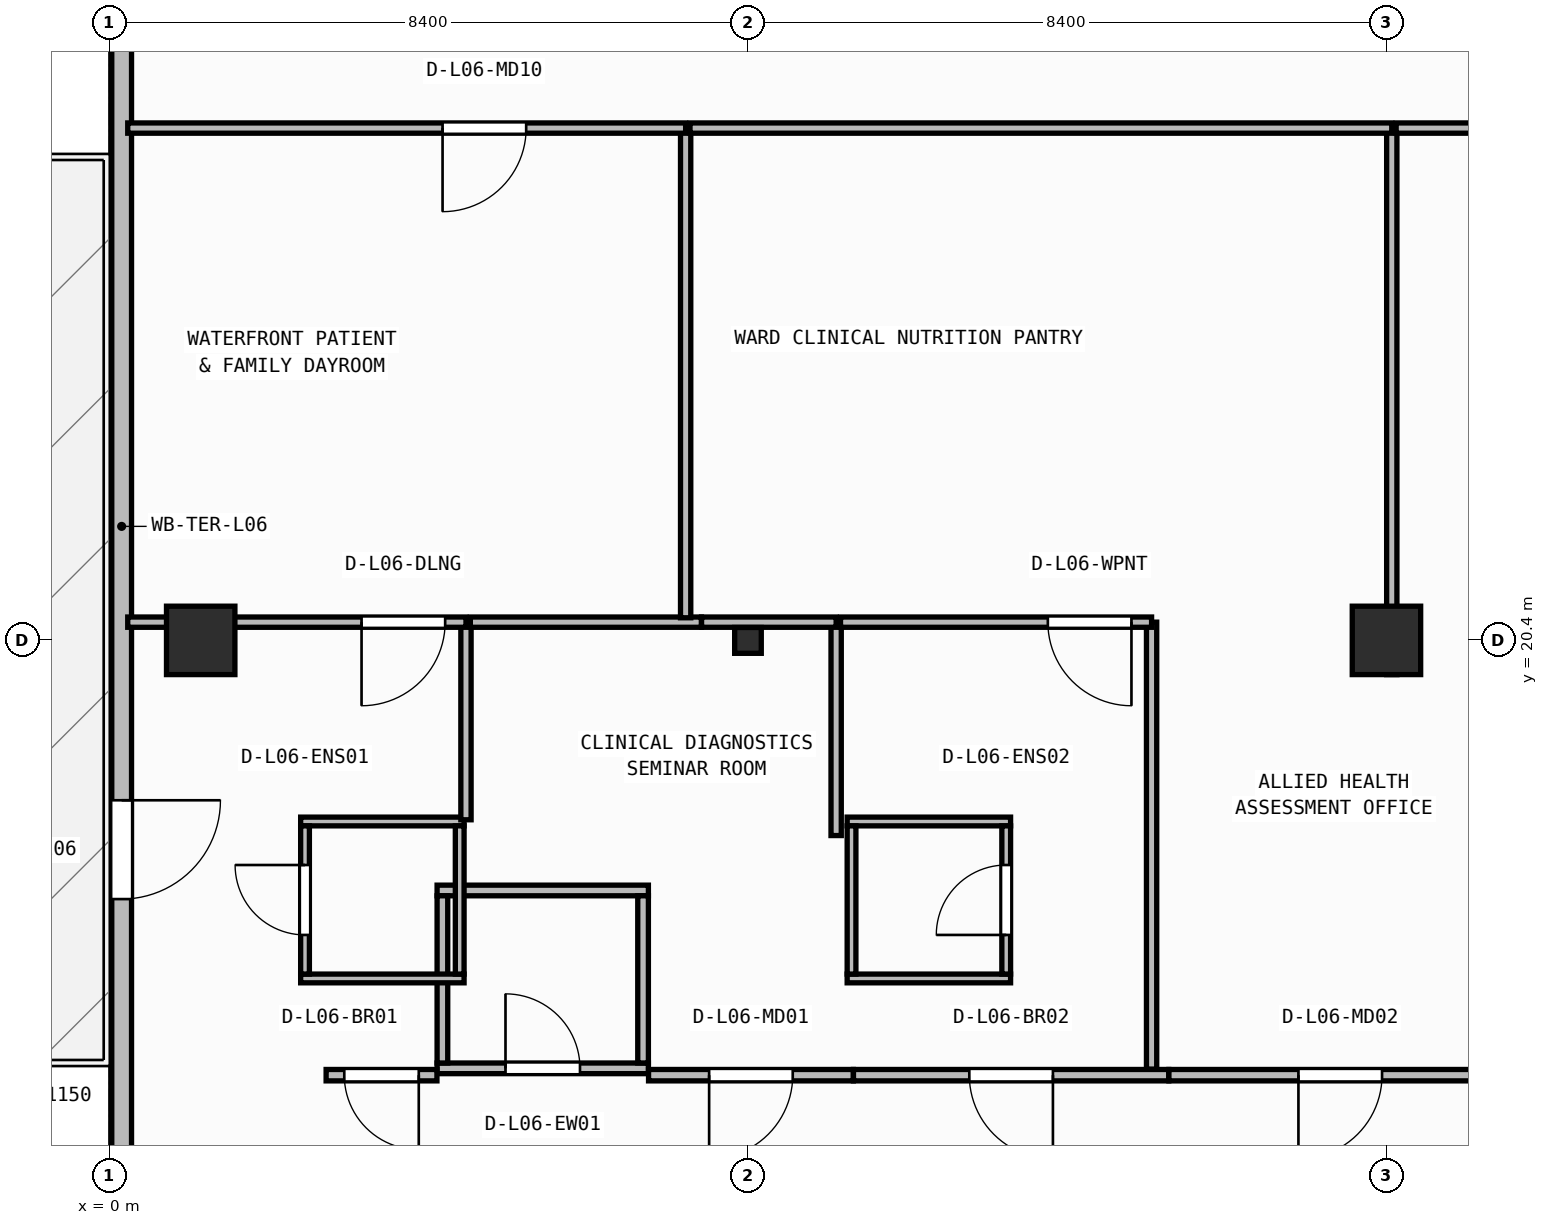
"""IFC4 building model, lengths in metres.
Left out: names, types, materials, properties, quantities, classifications, styles, units other than length and angle.
Written with IfcOpenShell. Run it as: python <this file> out.ifc"""

import sys

from ifc_helpers import new_model, si_unit, direction, frame, frame_2d, origin, origin_2d, place, context, subcontext, project, spatial, rectangle, i_section, extrude, element, fill, save


model = new_model("IFC4")
c1 = context("Model", 3, precision=1e-05, world=origin(), true_north=direction((0.0, 1.0)))
c2 = subcontext(c1, "Body", "Model", "MODEL_VIEW")
j1 = project(units=[si_unit("LENGTHUNIT", "METRE"), si_unit("PLANEANGLEUNIT", "RADIAN")], contexts=[c1])
p1 = place(None, origin())
s1 = spatial("IfcSite", under=j1, at=p1, CompositionType="ELEMENT")
p2 = place(p1, origin())
s2 = spatial("IfcBuilding", under=s1, at=p2, CompositionType="ELEMENT")
p3 = place(p2, frame((0.0, 0.0, 26.45)))
s3 = spatial("IfcBuildingStorey", under=s2, at=p3, CompositionType="ELEMENT", Elevation=26.45)
p4 = place(p3, frame((1.2, 20.4, 0.0), z_axis=(0.0, 0.0, 1.0), x_axis=(1.0, 0.0, 0.0)))
e1 = element("IfcColumn", 1, at=p4, inside=s3, PredefinedType="COLUMN", context=c2, shape_type="SweptSolid", body=[
    extrude(rectangle(XDim=0.9, YDim=0.9, at=origin_2d()), origin(), (0.0, 0.0, 1.0), 3.95),
])
p5 = place(p3, frame((8.4, 20.4, 0.0), z_axis=(0.0, 0.0, 1.0), x_axis=(1.0, 0.0, 0.0)))
e2 = element("IfcColumn", 2, at=p5, inside=s3, PredefinedType="COLUMN", context=c2, shape_type="SweptSolid", body=[
    extrude(i_section(OverallWidth=0.35, OverallDepth=0.34, WebThickness=0.016, FlangeThickness=0.028, at=origin_2d()), origin(), (0.0, 0.0, 1.0), 3.95),
])
p6 = place(p3, frame((16.8, 20.4, 0.0), z_axis=(0.0, 0.0, 1.0), x_axis=(1.0, 0.0, 0.0)))
e3 = element("IfcColumn", 3, at=p6, inside=s3, PredefinedType="COLUMN", context=c2, shape_type="SweptSolid", body=[
    extrude(rectangle(XDim=0.9, YDim=0.9, at=origin_2d()), origin(), (0.0, 0.0, 1.0), 3.95),
])
p7 = place(p3, frame((0.16, 41.04, 0.0), z_axis=(0.0, 0.0, 1.0), x_axis=(0.0, -1.0, 0.0)))
e4 = element("IfcWall", 4, at=p7, inside=s3, PredefinedType="STANDARD", context=c2, shape_type="SweptSolid", body=[
    extrude(rectangle(XDim=38.28, YDim=0.26, at=frame_2d((19.14, 0.0))), origin(), (0.0, 0.0, 1.0), 3.71),
])
p8 = place(p7, frame((22.743, 0.0, 0.0)))
e5 = element("IfcOpeningElement", 5, at=p8, cuts=e4, PredefinedType="OPENING", context=c2, shape_type="SweptSolid", body=[
    extrude(rectangle(XDim=1.3, YDim=2.15, at=frame_2d((0.65, 1.075))), frame((0.0, 0.14, 0.0), z_axis=(0.0, -1.0, 0.0), x_axis=(1.0, 0.0, 0.0)), (0.0, 0.0, 1.0), 0.28),
])
p9 = place(p3, frame((4.31, 14.77, 0.0), z_axis=(0.0, 0.0, 1.0), x_axis=(1.0, 0.0, 0.0)))
e6 = element("IfcWall", 6, at=p9, inside=s3, PredefinedType="PARTITIONING", context=c2, shape_type="SweptSolid", body=[
    extrude(rectangle(XDim=2.78, YDim=0.14, at=frame_2d((1.39, 0.0))), origin(), (0.0, 0.0, 1.0), 3.71),
])
p10 = place(p9, frame((0.9, 0.0, 0.0)))
e7 = element("IfcOpeningElement", 7, at=p10, cuts=e6, PredefinedType="OPENING", context=c2, shape_type="SweptSolid", body=[
    extrude(rectangle(XDim=0.98, YDim=2.1, at=frame_2d((0.49, 1.05))), frame((0.0, 0.08, 0.0), z_axis=(0.0, -1.0, 0.0), x_axis=(1.0, 0.0, 0.0)), (0.0, 0.0, 1.0), 0.16),
])
p11 = place(p3, frame((4.31, 17.11, 0.0), z_axis=(0.0, 0.0, 1.0), x_axis=(1.0, 0.0, 0.0)))
e8 = element("IfcWall", 8, at=p11, inside=s3, PredefinedType="PARTITIONING", context=c2, shape_type="SweptSolid", body=[
    extrude(rectangle(XDim=2.78, YDim=0.14, at=frame_2d((1.39, 0.0))), origin(), (0.0, 0.0, 1.0), 3.71),
])
for number, where, z_axis, x_axis in (
    (9, (4.38, 14.84, 0.0), (0.0, 0.0, 1.0), (0.0, 1.0, 0.0)),
    (10, (7.02, 14.84, 0.0), (0.0, 0.0, 1.0), (0.0, 1.0, 0.0)),
):
    element("IfcWall", number, at=place(p3, frame(where, z_axis=z_axis, x_axis=x_axis)), inside=s3, PredefinedType="PARTITIONING", context=c2, shape_type="SweptSolid", body=[
        extrude(rectangle(XDim=2.2, YDim=0.14, at=frame_2d((1.1, 0.0))), origin(), (0.0, 0.0, 1.0), 3.71),
    ])
for number, where, z_axis, x_axis in (
    (11, (2.515, 15.952, 0.0), (0.0, 0.0, 1.0), (1.0, 0.0, 0.0)),
    (12, (2.515, 18.018, 0.0), (0.0, 0.0, 1.0), (1.0, 0.0, 0.0)),
):
    element("IfcWall", number, at=place(p3, frame(where, z_axis=z_axis, x_axis=x_axis)), inside=s3, PredefinedType="PARTITIONING", context=c2, shape_type="SweptSolid", body=[
        extrude(rectangle(XDim=2.15, YDim=0.115, at=frame_2d((1.075, 0.0))), origin(), (0.0, 0.0, 1.0), 3.71),
    ])
p12 = place(p3, frame((2.573, 16.01, 0.0), z_axis=(0.0, 0.0, 1.0), x_axis=(0.0, 1.0, 0.0)))
e13 = element("IfcWall", 13, at=p12, inside=s3, PredefinedType="PARTITIONING", context=c2, shape_type="SweptSolid", body=[
    extrude(rectangle(XDim=1.95, YDim=0.115, at=frame_2d((0.975, 0.0))), origin(), (0.0, 0.0, 1.0), 3.71),
])
p13 = place(p12, frame((0.515, 0.0, 0.0)))
e14 = element("IfcOpeningElement", 14, at=p13, cuts=e13, PredefinedType="OPENING", context=c2, shape_type="SweptSolid", body=[
    extrude(rectangle(XDim=0.92, YDim=2.1, at=frame_2d((0.46, 1.05))), frame((0.0, 0.067, 0.0), z_axis=(0.0, -1.0, 0.0), x_axis=(1.0, 0.0, 0.0)), (0.0, 0.0, 1.0), 0.135),
])
p14 = place(p3, frame((4.607, 16.01, 0.0), z_axis=(0.0, 0.0, 1.0), x_axis=(0.0, 1.0, 0.0)))
e15 = element("IfcWall", 15, at=p14, inside=s3, PredefinedType="PARTITIONING", context=c2, shape_type="SweptSolid", body=[
    extrude(rectangle(XDim=1.95, YDim=0.115, at=frame_2d((0.975, 0.0))), origin(), (0.0, 0.0, 1.0), 3.71),
])
for number, where, z_axis, x_axis in (
    (16, (9.705, 15.952, 0.0), (0.0, 0.0, 1.0), (1.0, 0.0, 0.0)),
    (17, (9.705, 18.018, 0.0), (0.0, 0.0, 1.0), (1.0, 0.0, 0.0)),
):
    element("IfcWall", number, at=place(p3, frame(where, z_axis=z_axis, x_axis=x_axis)), inside=s3, PredefinedType="PARTITIONING", context=c2, shape_type="SweptSolid", body=[
        extrude(rectangle(XDim=2.15, YDim=0.115, at=frame_2d((1.075, 0.0))), origin(), (0.0, 0.0, 1.0), 3.71),
    ])
p15 = place(p3, frame((9.762, 16.01, 0.0), z_axis=(0.0, 0.0, 1.0), x_axis=(0.0, 1.0, 0.0)))
e18 = element("IfcWall", 18, at=p15, inside=s3, PredefinedType="PARTITIONING", context=c2, shape_type="SweptSolid", body=[
    extrude(rectangle(XDim=1.95, YDim=0.115, at=frame_2d((0.975, 0.0))), origin(), (0.0, 0.0, 1.0), 3.71),
])
p16 = place(p3, frame((11.798, 16.01, 0.0), z_axis=(0.0, 0.0, 1.0), x_axis=(0.0, 1.0, 0.0)))
e19 = element("IfcWall", 19, at=p16, inside=s3, PredefinedType="PARTITIONING", context=c2, shape_type="SweptSolid", body=[
    extrude(rectangle(XDim=1.95, YDim=0.115, at=frame_2d((0.975, 0.0))), origin(), (0.0, 0.0, 1.0), 3.71),
])
p17 = place(p16, frame((0.515, 0.0, 0.0)))
e20 = element("IfcOpeningElement", 20, at=p17, cuts=e19, PredefinedType="OPENING", context=c2, shape_type="SweptSolid", body=[
    extrude(rectangle(XDim=0.92, YDim=2.1, at=frame_2d((0.46, 1.05))), frame((0.0, 0.067, 0.0), z_axis=(0.0, -1.0, 0.0), x_axis=(1.0, 0.0, 0.0)), (0.0, 0.0, 1.0), 0.135),
])
p18 = place(p3, frame((4.308, 14.68, 0.0), z_axis=(0.0, 0.0, 1.0), x_axis=(-1.0, 0.0, 0.0)))
e21 = element("IfcWall", 21, at=p18, inside=s3, PredefinedType="PARTITIONING", context=c2, shape_type="SweptSolid", body=[
    extrude(rectangle(XDim=1.458, YDim=0.15, at=frame_2d((0.729, 0.0))), origin(), (0.0, 0.0, 1.0), 3.71),
])
p19 = place(p18, frame((0.239, 0.0, 0.0)))
e22 = element("IfcOpeningElement", 22, at=p19, cuts=e21, PredefinedType="OPENING", context=c2, shape_type="SweptSolid", body=[
    extrude(rectangle(XDim=0.98, YDim=2.1, at=frame_2d((0.49, 1.05))), frame((0.0, 0.085, 0.0), z_axis=(0.0, -1.0, 0.0), x_axis=(1.0, 0.0, 0.0)), (0.0, 0.0, 1.0), 0.17),
])
p20 = place(p3, frame((9.786, 14.68, 0.0), z_axis=(0.0, 0.0, 1.0), x_axis=(-1.0, 0.0, 0.0)))
e23 = element("IfcWall", 23, at=p20, inside=s3, PredefinedType="PARTITIONING", context=c2, shape_type="SweptSolid", body=[
    extrude(rectangle(XDim=2.694, YDim=0.15, at=frame_2d((1.347, 0.0))), origin(), (0.0, 0.0, 1.0), 3.71),
])
p21 = place(p20, frame((0.797, 0.0, 0.0)))
e24 = element("IfcOpeningElement", 24, at=p21, cuts=e23, PredefinedType="OPENING", context=c2, shape_type="SweptSolid", body=[
    extrude(rectangle(XDim=1.1, YDim=2.1, at=frame_2d((0.55, 1.05))), frame((0.0, 0.085, 0.0), z_axis=(0.0, -1.0, 0.0), x_axis=(1.0, 0.0, 0.0)), (0.0, 0.0, 1.0), 0.17),
])
p22 = place(p3, frame((13.936, 14.68, 0.0), z_axis=(0.0, 0.0, 1.0), x_axis=(-1.0, 0.0, 0.0)))
e25 = element("IfcWall", 25, at=p22, inside=s3, PredefinedType="PARTITIONING", context=c2, shape_type="SweptSolid", body=[
    extrude(rectangle(XDim=4.148, YDim=0.15, at=frame_2d((2.074, 0.0))), origin(), (0.0, 0.0, 1.0), 3.71),
])
p23 = place(p22, frame((1.524, 0.0, 0.0)))
e26 = element("IfcOpeningElement", 26, at=p23, cuts=e25, PredefinedType="OPENING", context=c2, shape_type="SweptSolid", body=[
    extrude(rectangle(XDim=1.1, YDim=2.1, at=frame_2d((0.55, 1.05))), frame((0.0, 0.085, 0.0), z_axis=(0.0, -1.0, 0.0), x_axis=(1.0, 0.0, 0.0)), (0.0, 0.0, 1.0), 0.17),
])
p24 = place(p3, frame((18.446, 14.68, 0.0), z_axis=(0.0, 0.0, 1.0), x_axis=(-1.0, 0.0, 0.0)))
e27 = element("IfcWall", 27, at=p24, inside=s3, PredefinedType="PARTITIONING", context=c2, shape_type="SweptSolid", body=[
    extrude(rectangle(XDim=4.508, YDim=0.15, at=frame_2d((2.254, 0.0))), origin(), (0.0, 0.0, 1.0), 3.71),
])
p25 = place(p24, frame((1.704, 0.0, 0.0)))
e28 = element("IfcOpeningElement", 28, at=p25, cuts=e27, PredefinedType="OPENING", context=c2, shape_type="SweptSolid", body=[
    extrude(rectangle(XDim=1.1, YDim=2.1, at=frame_2d((0.55, 1.05))), frame((0.0, 0.085, 0.0), z_axis=(0.0, -1.0, 0.0), x_axis=(1.0, 0.0, 0.0)), (0.0, 0.0, 1.0), 0.17),
])
p26 = place(p3, frame((4.69, 18.04, 0.0), z_axis=(0.0, 0.0, 1.0), x_axis=(0.0, 1.0, 0.0)))
e29 = element("IfcWall", 29, at=p26, inside=s3, PredefinedType="PARTITIONING", context=c2, shape_type="SweptSolid", body=[
    extrude(rectangle(XDim=2.6, YDim=0.135, at=frame_2d((1.3, 0.0))), origin(), (0.0, 0.0, 1.0), 3.71),
])
p27 = place(p3, frame((4.69, 20.64, 0.0), z_axis=(0.0, 0.0, 1.0), x_axis=(-1.0, 0.0, 0.0)))
e30 = element("IfcWall", 30, at=p27, inside=s3, PredefinedType="PARTITIONING", context=c2, shape_type="SweptSolid", body=[
    extrude(rectangle(XDim=4.45, YDim=0.135, at=frame_2d((2.225, 0.0))), origin(), (0.0, 0.0, 1.0), 3.073),
])
p28 = place(p27, frame((0.274, 0.0, 0.0)))
e31 = element("IfcOpeningElement", 31, at=p28, cuts=e30, PredefinedType="OPENING", context=c2, shape_type="SweptSolid", body=[
    extrude(rectangle(XDim=1.1, YDim=2.1, at=frame_2d((0.55, 1.05))), frame((0.0, 0.077, 0.0), z_axis=(0.0, -1.0, 0.0), x_axis=(1.0, 0.0, 0.0)), (0.0, 0.0, 1.0), 0.155),
])
p29 = place(p3, frame((9.56, 17.833, 0.0), z_axis=(0.0, 0.0, 1.0), x_axis=(0.0, 1.0, 0.0)))
e32 = element("IfcWall", 32, at=p29, inside=s3, PredefinedType="PARTITIONING", context=c2, shape_type="SweptSolid", body=[
    extrude(rectangle(XDim=2.807, YDim=0.135, at=frame_2d((1.404, 0.0))), origin(), (0.0, 0.0, 1.0), 3.71),
])
p30 = place(p3, frame((7.788, 20.64, 0.0), z_axis=(0.0, 0.0, 1.0), x_axis=(-1.0, 0.0, 0.0)))
e33 = element("IfcWall", 33, at=p30, inside=s3, PredefinedType="PARTITIONING", context=c2, shape_type="SweptSolid", body=[
    extrude(rectangle(XDim=3.04, YDim=0.135, at=frame_2d((1.52, 0.0))), origin(), (0.0, 0.0, 1.0), 3.073),
])
p31 = place(p3, frame((9.56, 20.64, 0.0), z_axis=(0.0, 0.0, 1.0), x_axis=(-1.0, 0.0, 0.0)))
e34 = element("IfcWall", 34, at=p31, inside=s3, PredefinedType="PARTITIONING", context=c2, shape_type="SweptSolid", body=[
    extrude(rectangle(XDim=1.771, YDim=0.135, at=frame_2d((0.885, 0.0))), origin(), (0.0, 0.0, 1.0), 3.073),
])
p32 = place(p3, frame((13.71, 14.76, 0.0), z_axis=(0.0, 0.0, 1.0), x_axis=(0.0, 1.0, 0.0)))
e35 = element("IfcWall", 35, at=p32, inside=s3, PredefinedType="PARTITIONING", context=c2, shape_type="SweptSolid", body=[
    extrude(rectangle(XDim=5.88, YDim=0.135, at=frame_2d((2.94, 0.0))), origin(), (0.0, 0.0, 1.0), 3.71),
])
p33 = place(p3, frame((13.71, 20.64, 0.0), z_axis=(0.0, 0.0, 1.0), x_axis=(-1.0, 0.0, 0.0)))
e36 = element("IfcWall", 36, at=p33, inside=s3, PredefinedType="PARTITIONING", context=c2, shape_type="SweptSolid", body=[
    extrude(rectangle(XDim=4.093, YDim=0.135, at=frame_2d((2.046, 0.0))), origin(), (0.0, 0.0, 1.0), 3.073),
])
p34 = place(p33, frame((0.265, 0.0, 0.0)))
e37 = element("IfcOpeningElement", 37, at=p34, cuts=e36, PredefinedType="OPENING", context=c2, shape_type="SweptSolid", body=[
    extrude(rectangle(XDim=1.1, YDim=2.1, at=frame_2d((0.55, 1.05))), frame((0.0, 0.077, 0.0), z_axis=(0.0, -1.0, 0.0), x_axis=(1.0, 0.0, 0.0)), (0.0, 0.0, 1.0), 0.155),
])
p35 = place(p3, frame((7.58, 20.698, 0.0), z_axis=(0.0, 0.0, 1.0), x_axis=(0.0, 1.0, 0.0)))
e38 = element("IfcWall", 38, at=p35, inside=s3, PredefinedType="PARTITIONING", context=c2, shape_type="SweptSolid", body=[
    extrude(rectangle(XDim=6.442, YDim=0.135, at=frame_2d((3.221, 0.0))), origin(), (0.0, 0.0, 1.0), 3.71),
])
p36 = place(p3, frame((7.58, 27.14, 0.0), z_axis=(0.0, 0.0, 1.0), x_axis=(-1.0, 0.0, 0.0)))
e39 = element("IfcWall", 39, at=p36, inside=s3, PredefinedType="PARTITIONING", context=c2, shape_type="SweptSolid", body=[
    extrude(rectangle(XDim=7.34, YDim=0.135, at=frame_2d((3.67, 0.0))), origin(), (0.0, 0.0, 1.0), 3.71),
])
p37 = place(p36, frame((2.098, 0.0, 0.0)))
e40 = element("IfcOpeningElement", 40, at=p37, cuts=e39, PredefinedType="OPENING", context=c2, shape_type="SweptSolid", body=[
    extrude(rectangle(XDim=1.1, YDim=2.1, at=frame_2d((0.55, 1.05))), frame((0.0, 0.077, 0.0), z_axis=(0.0, -1.0, 0.0), x_axis=(1.0, 0.0, 0.0)), (0.0, 0.0, 1.0), 0.155),
])
p38 = place(p3, frame((16.87, 19.95, 0.0), z_axis=(0.0, 0.0, 1.0), x_axis=(0.0, 1.0, 0.0)))
e41 = element("IfcWall", 41, at=p38, inside=s3, PredefinedType="PARTITIONING", context=c2, shape_type="SweptSolid", body=[
    extrude(rectangle(XDim=7.19, YDim=0.135, at=frame_2d((3.595, 0.0))), origin(), (0.0, 0.0, 1.0), 3.073),
])
p39 = place(p3, frame((16.87, 27.14, 0.0), z_axis=(0.0, 0.0, 1.0), x_axis=(-1.0, 0.0, 0.0)))
e42 = element("IfcWall", 42, at=p39, inside=s3, PredefinedType="PARTITIONING", context=c2, shape_type="SweptSolid", body=[
    extrude(rectangle(XDim=9.233, YDim=0.135, at=frame_2d((4.616, 0.0))), origin(), (0.0, 0.0, 1.0), 3.71),
])
p40 = place(p3, frame((18.748, 27.14, 0.0), z_axis=(0.0, 0.0, 1.0), x_axis=(-1.0, 0.0, 0.0)))
e43 = element("IfcWall", 43, at=p40, inside=s3, PredefinedType="PARTITIONING", context=c2, shape_type="SweptSolid", body=[
    extrude(rectangle(XDim=1.82, YDim=0.135, at=frame_2d((0.91, 0.0))), origin(), (0.0, 0.0, 1.0), 3.71),
])
p41 = place(p8, origin())
e44 = element("IfcDoor", 44, at=p41, inside=s3, OperationType="SINGLE_SWING_LEFT", PredefinedType="DOOR", context=c2, shape_type="SweptSolid", body=[
    extrude(rectangle(XDim=1.3, YDim=2.15, at=frame_2d((0.65, 1.075))), frame((0.0, 0.025, 0.0), z_axis=(0.0, -1.0, 0.0), x_axis=(1.0, 0.0, 0.0)), (0.0, 0.0, 1.0), 0.05),
])
fill(e5, e44)
p42 = place(p10, origin())
e45 = element("IfcDoor", 45, at=p42, inside=s3, OperationType="SINGLE_SWING_LEFT", PredefinedType="DOOR", context=c2, shape_type="SweptSolid", body=[
    extrude(rectangle(XDim=0.98, YDim=2.1, at=frame_2d((0.49, 1.05))), frame((0.0, 0.025, 0.0), z_axis=(0.0, -1.0, 0.0), x_axis=(1.0, 0.0, 0.0)), (0.0, 0.0, 1.0), 0.05),
])
fill(e7, e45)
p43 = place(p13, origin())
e46 = element("IfcDoor", 46, at=p43, inside=s3, OperationType="SINGLE_SWING_RIGHT", PredefinedType="DOOR", context=c2, shape_type="SweptSolid", body=[
    extrude(rectangle(XDim=0.92, YDim=2.1, at=frame_2d((0.46, 1.05))), frame((0.0, 0.025, 0.0), z_axis=(0.0, -1.0, 0.0), x_axis=(1.0, 0.0, 0.0)), (0.0, 0.0, 1.0), 0.05),
])
fill(e14, e46)
p44 = place(p17, origin())
e47 = element("IfcDoor", 47, at=p44, inside=s3, OperationType="SINGLE_SWING_LEFT", PredefinedType="DOOR", context=c2, shape_type="SweptSolid", body=[
    extrude(rectangle(XDim=0.92, YDim=2.1, at=frame_2d((0.46, 1.05))), frame((0.0, 0.025, 0.0), z_axis=(0.0, -1.0, 0.0), x_axis=(1.0, 0.0, 0.0)), (0.0, 0.0, 1.0), 0.05),
])
fill(e20, e47)
p45 = place(p19, origin())
e48 = element("IfcDoor", 48, at=p45, inside=s3, OperationType="SINGLE_SWING_LEFT", PredefinedType="DOOR", context=c2, shape_type="SweptSolid", body=[
    extrude(rectangle(XDim=0.98, YDim=2.1, at=frame_2d((0.49, 1.05))), frame((0.0, 0.025, 0.0), z_axis=(0.0, -1.0, 0.0), x_axis=(1.0, 0.0, 0.0)), (0.0, 0.0, 1.0), 0.05),
])
fill(e22, e48)
p46 = place(p21, origin())
e49 = element("IfcDoor", 49, at=p46, inside=s3, OperationType="SINGLE_SWING_RIGHT", PredefinedType="DOOR", context=c2, shape_type="SweptSolid", body=[
    extrude(rectangle(XDim=1.1, YDim=2.1, at=frame_2d((0.55, 1.05))), frame((0.0, 0.025, 0.0), z_axis=(0.0, -1.0, 0.0), x_axis=(1.0, 0.0, 0.0)), (0.0, 0.0, 1.0), 0.05),
])
fill(e24, e49)
p47 = place(p23, origin())
e50 = element("IfcDoor", 50, at=p47, inside=s3, OperationType="SINGLE_SWING_LEFT", PredefinedType="DOOR", context=c2, shape_type="SweptSolid", body=[
    extrude(rectangle(XDim=1.1, YDim=2.1, at=frame_2d((0.55, 1.05))), frame((0.0, 0.025, 0.0), z_axis=(0.0, -1.0, 0.0), x_axis=(1.0, 0.0, 0.0)), (0.0, 0.0, 1.0), 0.05),
])
fill(e26, e50)
p48 = place(p25, origin())
e51 = element("IfcDoor", 51, at=p48, inside=s3, OperationType="SINGLE_SWING_RIGHT", PredefinedType="DOOR", context=c2, shape_type="SweptSolid", body=[
    extrude(rectangle(XDim=1.1, YDim=2.1, at=frame_2d((0.55, 1.05))), frame((0.0, 0.025, 0.0), z_axis=(0.0, -1.0, 0.0), x_axis=(1.0, 0.0, 0.0)), (0.0, 0.0, 1.0), 0.05),
])
fill(e28, e51)
p49 = place(p28, origin())
e52 = element("IfcDoor", 52, at=p49, inside=s3, OperationType="SINGLE_SWING_RIGHT", PredefinedType="DOOR", context=c2, shape_type="SweptSolid", body=[
    extrude(rectangle(XDim=1.1, YDim=2.1, at=frame_2d((0.55, 1.05))), frame((0.0, 0.025, 0.0), z_axis=(0.0, -1.0, 0.0), x_axis=(1.0, 0.0, 0.0)), (0.0, 0.0, 1.0), 0.05),
])
fill(e31, e52)
p50 = place(p34, origin())
e53 = element("IfcDoor", 53, at=p50, inside=s3, OperationType="SINGLE_SWING_LEFT", PredefinedType="DOOR", context=c2, shape_type="SweptSolid", body=[
    extrude(rectangle(XDim=1.1, YDim=2.1, at=frame_2d((0.55, 1.05))), frame((0.0, 0.025, 0.0), z_axis=(0.0, -1.0, 0.0), x_axis=(1.0, 0.0, 0.0)), (0.0, 0.0, 1.0), 0.05),
])
fill(e37, e53)
p51 = place(p37, origin())
e54 = element("IfcDoor", 54, at=p51, inside=s3, OperationType="SINGLE_SWING_RIGHT", PredefinedType="DOOR", context=c2, shape_type="SweptSolid", body=[
    extrude(rectangle(XDim=1.1, YDim=2.1, at=frame_2d((0.55, 1.05))), frame((0.0, 0.025, 0.0), z_axis=(0.0, -1.0, 0.0), x_axis=(1.0, 0.0, 0.0)), (0.0, 0.0, 1.0), 0.05),
])
fill(e40, e54)
save(model, sys.argv[1])
